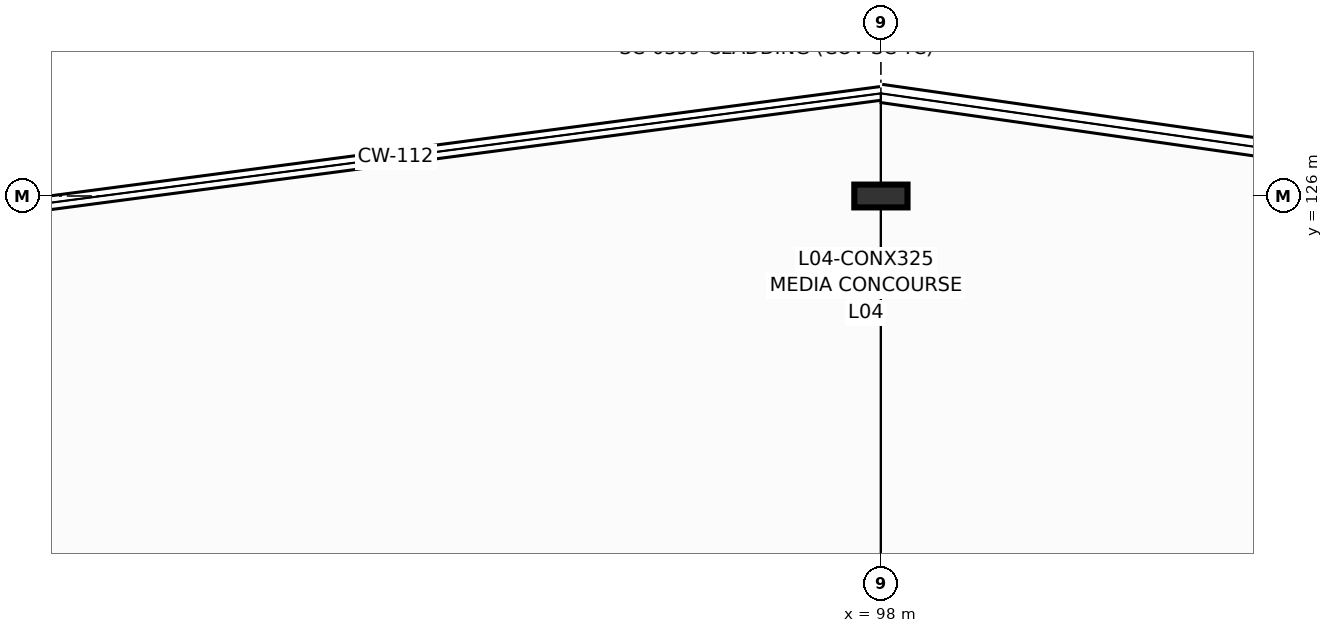
"""IFC4 building model, lengths in metres.
Left out: names, types, materials, properties, quantities, classifications, styles, units other than length and angle.
Written with IfcOpenShell. Run it as: python <this file> out.ifc"""

import sys

from ifc_helpers import new_model, si_unit, direction, frame, origin, origin_2d, place, context, subcontext, project, spatial, i_section, extrude, element, save


model = new_model("IFC4")
c1 = context("Model", 3, precision=1e-05, world=origin(), true_north=direction((0.0, 1.0)))
c2 = subcontext(c1, "Body", "Model", "MODEL_VIEW")
j1 = project(units=[si_unit("LENGTHUNIT", "METRE"), si_unit("PLANEANGLEUNIT", "RADIAN")], contexts=[c1])
p1 = place(None, origin())
s1 = spatial("IfcSite", under=j1, at=p1, CompositionType="ELEMENT")
p2 = place(p1, origin())
s2 = spatial("IfcBuilding", under=s1, at=p2, CompositionType="ELEMENT")
p3 = place(p2, frame((0.0, 0.0, 18.0)))
s3 = spatial("IfcBuildingStorey", under=s2, at=p3, CompositionType="ELEMENT", Elevation=18.0)
p4 = place(p3, frame((98.0, 126.0, 0.0), z_axis=(0.0, 0.0, 1.0), x_axis=(0.0, 1.0, 0.0)))
e1 = element("IfcColumn", 1, at=p4, inside=s3, PredefinedType="COLUMN", context=c2, shape_type="SweptSolid", body=[
    extrude(i_section(OverallWidth=0.3, OverallDepth=0.7, WebThickness=0.017, FlangeThickness=0.032, at=origin_2d()), origin(), (0.0, 0.0, 1.0), 4.5),
])
save(model, sys.argv[1])
